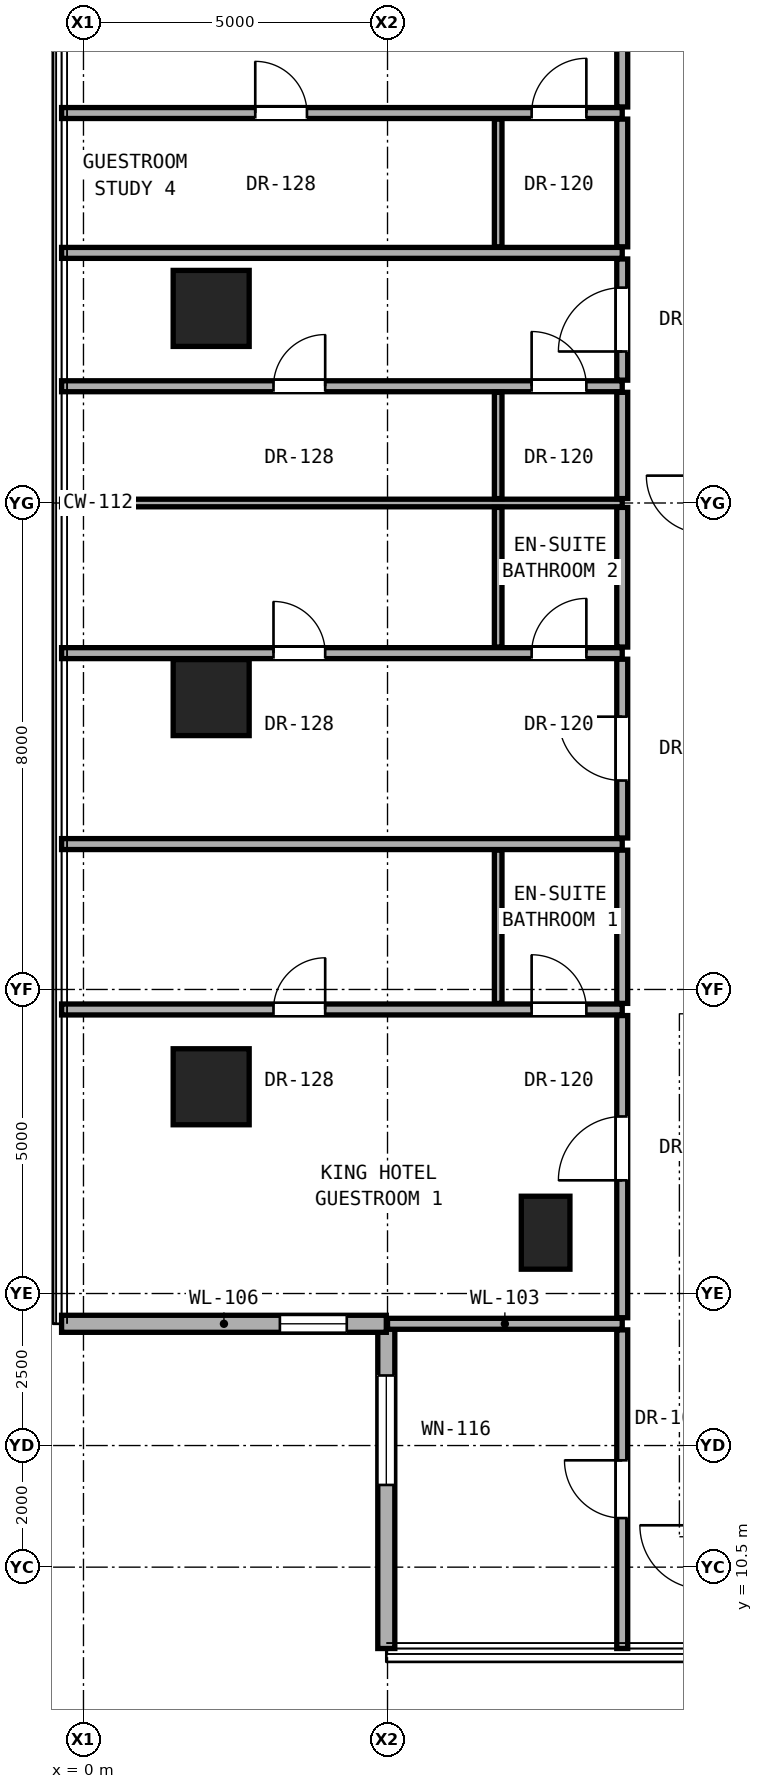
"""IFC4 building model, lengths in metres.
Left out: names, types, materials, properties, quantities, classifications, styles, units other than length and angle.
Written with IfcOpenShell. Run it as: python <this file> out.ifc"""

import sys

from ifc_helpers import new_model, si_unit, direction, frame, frame_2d, origin, origin_2d, place, context, subcontext, project, spatial, rectangle, hollow_rectangle, extrude, element, fill, save


model = new_model("IFC4")
c1 = context("Model", 3, precision=1e-05, world=origin(), true_north=direction((0.0, 1.0)))
c2 = subcontext(c1, "Body", "Model", "MODEL_VIEW")
j1 = project(units=[si_unit("LENGTHUNIT", "METRE"), si_unit("PLANEANGLEUNIT", "RADIAN")], contexts=[c1])
p1 = place(None, origin())
s1 = spatial("IfcSite", under=j1, at=p1, CompositionType="ELEMENT")
p2 = place(p1, origin())
s2 = spatial("IfcBuilding", under=s1, at=p2, CompositionType="ELEMENT")
p3 = place(p2, frame((0.0, 0.0, 55.4)))
s3 = spatial("IfcBuildingStorey", under=s2, at=p3, CompositionType="ELEMENT", Elevation=55.4)
for number, where, z_axis, x_axis in (
    (1, (2.1, 18.4, 0.0), (0.0, 0.0, 1.0), (1.0, 0.0, 0.0)),
    (2, (2.1, 24.8, 0.0), (0.0, 0.0, 1.0), (1.0, 0.0, 0.0)),
    (3, (2.1, 31.2, 0.0), (0.0, 0.0, 1.0), (1.0, 0.0, 0.0)),
):
    element("IfcColumn", number, at=place(p3, frame(where, z_axis=z_axis, x_axis=x_axis)), inside=s3, PredefinedType="COLUMN", context=c2, shape_type="SweptSolid", body=[
        extrude(hollow_rectangle(XDim=1.25, YDim=1.25, WallThickness=0.07, at=origin_2d()), origin(), (0.0, 0.0, 1.0), 3.3),
    ])
p4 = place(p3, frame((7.6, 16.0, 0.0), z_axis=(0.0, 0.0, 1.0), x_axis=(1.0, 0.0, 0.0)))
e4 = element("IfcColumn", 4, at=p4, inside=s3, PredefinedType="PILASTER", context=c2, shape_type="SweptSolid", body=[
    extrude(rectangle(XDim=0.8, YDim=1.2, at=origin_2d()), origin(), (0.0, 0.0, 1.0), 3.3),
])
p5 = place(p3, frame((4.98, 14.502, 0.0), z_axis=(0.0, 0.0, 1.0), x_axis=(0.0, -1.0, 0.0)))
e5 = element("IfcWall", 5, at=p5, inside=s3, PredefinedType="SOLIDWALL", context=c2, shape_type="SweptSolid", body=[
    extrude(rectangle(XDim=5.34, YDim=0.28, at=frame_2d((2.67, 0.0))), origin(), (0.0, 0.0, 1.0), 3.04),
])
p6 = place(p5, frame((0.85, 0.0, 0.79)))
e6 = element("IfcOpeningElement", 6, at=p6, cuts=e5, PredefinedType="OPENING", context=c2, shape_type="SweptSolid", body=[
    extrude(rectangle(XDim=1.8, YDim=2.1, at=frame_2d((0.9, 1.05))), frame((0.0, 0.15, 0.0), z_axis=(0.0, -1.0, 0.0), x_axis=(1.0, 0.0, 0.0)), (0.0, 0.0, 1.0), 0.3),
])
p7 = place(p3, frame((-0.36, 14.502, 0.0), z_axis=(0.0, 0.0, 1.0), x_axis=(1.0, 0.0, 0.0)))
e7 = element("IfcWall", 7, at=p7, inside=s3, PredefinedType="SOLIDWALL", context=c2, shape_type="SweptSolid", body=[
    extrude(rectangle(XDim=5.34, YDim=0.28, at=frame_2d((2.67, 0.0))), origin(), (0.0, 0.0, 1.0), 3.04),
])
p8 = place(p7, frame((3.59, 0.0, 0.85)))
e8 = element("IfcOpeningElement", 8, at=p8, cuts=e7, PredefinedType="OPENING", context=c2, shape_type="SweptSolid", body=[
    extrude(rectangle(XDim=1.1, YDim=2.0, at=frame_2d((0.55, 1.0))), frame((0.0, 0.15, 0.0), z_axis=(0.0, -1.0, 0.0), x_axis=(1.0, 0.0, 0.0)), (0.0, 0.0, 1.0), 0.3),
])
p9 = place(p3, frame((5.0, 14.502, 0.0), z_axis=(0.0, 0.0, 1.0), x_axis=(1.0, 0.0, 0.0)))
e9 = element("IfcWall", 9, at=p9, inside=s3, PredefinedType="PARTITIONING", context=c2, shape_type="SweptSolid", body=[
    extrude(rectangle(XDim=3.86, YDim=0.18, at=frame_2d((1.93, 0.0))), origin(), (0.0, 0.0, 1.0), 3.06),
])
p10 = place(p3, frame((-0.36, 19.671, 0.0), z_axis=(0.0, 0.0, 1.0), x_axis=(1.0, 0.0, 0.0)))
e10 = element("IfcWall", 10, at=p10, inside=s3, PredefinedType="PARTITIONING", context=c2, shape_type="SweptSolid", body=[
    extrude(rectangle(XDim=9.22, YDim=0.18, at=frame_2d((4.61, 0.0))), origin(), (0.0, 0.0, 1.0), 2.125),
])
p11 = place(p10, frame((3.485, 0.0, 0.0)))
e11 = element("IfcOpeningElement", 11, at=p11, cuts=e10, PredefinedType="OPENING", context=c2, shape_type="SweptSolid", body=[
    extrude(rectangle(XDim=0.85, YDim=2.01, at=frame_2d((0.425, 1.005))), frame((0.0, 0.1, 0.0), z_axis=(0.0, -1.0, 0.0), x_axis=(1.0, 0.0, 0.0)), (0.0, 0.0, 1.0), 0.2),
])
p12 = place(p10, frame((7.73, 0.0, 0.0)))
e12 = element("IfcOpeningElement", 12, at=p12, cuts=e10, PredefinedType="OPENING", context=c2, shape_type="SweptSolid", body=[
    extrude(rectangle(XDim=0.9, YDim=2.1, at=frame_2d((0.45, 1.05))), frame((0.0, 0.1, 0.0), z_axis=(0.0, -1.0, 0.0), x_axis=(1.0, 0.0, 0.0)), (0.0, 0.0, 1.0), 0.2),
])
p13 = place(p3, frame((-0.36, 22.391, 0.0), z_axis=(0.0, 0.0, 1.0), x_axis=(1.0, 0.0, 0.0)))
e13 = element("IfcWall", 13, at=p13, inside=s3, PredefinedType="PARTITIONING", context=c2, shape_type="SweptSolid", body=[
    extrude(rectangle(XDim=9.22, YDim=0.18, at=frame_2d((4.61, 0.0))), origin(), (0.0, 0.0, 1.0), 2.125),
])
p14 = place(p3, frame((-0.36, 25.531, 0.0), z_axis=(0.0, 0.0, 1.0), x_axis=(1.0, 0.0, 0.0)))
e14 = element("IfcWall", 14, at=p14, inside=s3, PredefinedType="PARTITIONING", context=c2, shape_type="SweptSolid", body=[
    extrude(rectangle(XDim=9.22, YDim=0.18, at=frame_2d((4.61, 0.0))), origin(), (0.0, 0.0, 1.0), 2.125),
])
p15 = place(p14, frame((3.485, 0.0, 0.0)))
e15 = element("IfcOpeningElement", 15, at=p15, cuts=e14, PredefinedType="OPENING", context=c2, shape_type="SweptSolid", body=[
    extrude(rectangle(XDim=0.85, YDim=2.01, at=frame_2d((0.425, 1.005))), frame((0.0, 0.1, 0.0), z_axis=(0.0, -1.0, 0.0), x_axis=(1.0, 0.0, 0.0)), (0.0, 0.0, 1.0), 0.2),
])
p16 = place(p14, frame((7.73, 0.0, 0.0)))
e16 = element("IfcOpeningElement", 16, at=p16, cuts=e14, PredefinedType="OPENING", context=c2, shape_type="SweptSolid", body=[
    extrude(rectangle(XDim=0.9, YDim=2.1, at=frame_2d((0.45, 1.05))), frame((0.0, 0.1, 0.0), z_axis=(0.0, -1.0, 0.0), x_axis=(1.0, 0.0, 0.0)), (0.0, 0.0, 1.0), 0.2),
])
p17 = place(p3, frame((-0.36, 28.0, 0.0), z_axis=(0.0, 0.0, 1.0), x_axis=(1.0, 0.0, 0.0)))
e17 = element("IfcWall", 17, at=p17, inside=s3, PredefinedType="PARTITIONING", context=c2, shape_type="SweptSolid", body=[
    extrude(rectangle(XDim=9.22, YDim=0.125, at=frame_2d((4.61, 0.0))), origin(), (0.0, 0.0, 1.0), 2.125),
])
p18 = place(p3, frame((-0.36, 29.92, 0.0), z_axis=(0.0, 0.0, 1.0), x_axis=(1.0, 0.0, 0.0)))
e18 = element("IfcWall", 18, at=p18, inside=s3, PredefinedType="PARTITIONING", context=c2, shape_type="SweptSolid", body=[
    extrude(rectangle(XDim=9.22, YDim=0.18, at=frame_2d((4.61, 0.0))), origin(), (0.0, 0.0, 1.0), 2.125),
])
p19 = place(p18, frame((3.485, 0.0, 0.0)))
e19 = element("IfcOpeningElement", 19, at=p19, cuts=e18, PredefinedType="OPENING", context=c2, shape_type="SweptSolid", body=[
    extrude(rectangle(XDim=0.85, YDim=2.01, at=frame_2d((0.425, 1.005))), frame((0.0, 0.1, 0.0), z_axis=(0.0, -1.0, 0.0), x_axis=(1.0, 0.0, 0.0)), (0.0, 0.0, 1.0), 0.2),
])
p20 = place(p18, frame((7.73, 0.0, 0.0)))
e20 = element("IfcOpeningElement", 20, at=p20, cuts=e18, PredefinedType="OPENING", context=c2, shape_type="SweptSolid", body=[
    extrude(rectangle(XDim=0.9, YDim=2.1, at=frame_2d((0.45, 1.05))), frame((0.0, 0.1, 0.0), z_axis=(0.0, -1.0, 0.0), x_axis=(1.0, 0.0, 0.0)), (0.0, 0.0, 1.0), 0.2),
])
p21 = place(p3, frame((-0.36, 32.113, 0.0), z_axis=(0.0, 0.0, 1.0), x_axis=(1.0, 0.0, 0.0)))
e21 = element("IfcWall", 21, at=p21, inside=s3, PredefinedType="PARTITIONING", context=c2, shape_type="SweptSolid", body=[
    extrude(rectangle(XDim=9.22, YDim=0.18, at=frame_2d((4.61, 0.0))), origin(), (0.0, 0.0, 1.0), 2.125),
])
p22 = place(p3, frame((-0.36, 34.413, 0.0), z_axis=(0.0, 0.0, 1.0), x_axis=(1.0, 0.0, 0.0)))
e22 = element("IfcWall", 22, at=p22, inside=s3, PredefinedType="PARTITIONING", context=c2, shape_type="SweptSolid", body=[
    extrude(rectangle(XDim=9.22, YDim=0.18, at=frame_2d((4.61, 0.0))), origin(), (0.0, 0.0, 1.0), 2.125),
])
p23 = place(p22, frame((3.185, 0.0, 0.0)))
e23 = element("IfcOpeningElement", 23, at=p23, cuts=e22, PredefinedType="OPENING", context=c2, shape_type="SweptSolid", body=[
    extrude(rectangle(XDim=0.85, YDim=2.01, at=frame_2d((0.425, 1.005))), frame((0.0, 0.1, 0.0), z_axis=(0.0, -1.0, 0.0), x_axis=(1.0, 0.0, 0.0)), (0.0, 0.0, 1.0), 0.2),
])
p24 = place(p22, frame((7.73, 0.0, 0.0)))
e24 = element("IfcOpeningElement", 24, at=p24, cuts=e22, PredefinedType="OPENING", context=c2, shape_type="SweptSolid", body=[
    extrude(rectangle(XDim=0.9, YDim=2.1, at=frame_2d((0.45, 1.05))), frame((0.0, 0.1, 0.0), z_axis=(0.0, -1.0, 0.0), x_axis=(1.0, 0.0, 0.0)), (0.0, 0.0, 1.0), 0.2),
])
p25 = place(p3, frame((6.82, 19.771, 0.0), z_axis=(0.0, 0.0, 1.0), x_axis=(0.0, 1.0, 0.0)))
e25 = element("IfcWall", 25, at=p25, inside=s3, PredefinedType="PARTITIONING", context=c2, shape_type="SweptSolid", body=[
    extrude(rectangle(XDim=2.52, YDim=0.125, at=frame_2d((1.26, 0.0))), origin(), (0.0, 0.0, 1.0), 3.06),
])
p26 = place(p3, frame((6.82, 25.631, 0.0), z_axis=(0.0, 0.0, 1.0), x_axis=(0.0, 1.0, 0.0)))
e26 = element("IfcWall", 26, at=p26, inside=s3, PredefinedType="PARTITIONING", context=c2, shape_type="SweptSolid", body=[
    extrude(rectangle(XDim=2.296, YDim=0.125, at=frame_2d((1.148, 0.0))), origin(), (0.0, 0.0, 1.0), 3.06),
])
p27 = place(p3, frame((6.82, 28.073, 0.0), z_axis=(0.0, 0.0, 1.0), x_axis=(0.0, 1.0, 0.0)))
e27 = element("IfcWall", 27, at=p27, inside=s3, PredefinedType="PARTITIONING", context=c2, shape_type="SweptSolid", body=[
    extrude(rectangle(XDim=1.748, YDim=0.125, at=frame_2d((0.874, 0.0))), origin(), (0.0, 0.0, 1.0), 3.06),
])
p28 = place(p3, frame((6.82, 32.213, 0.0), z_axis=(0.0, 0.0, 1.0), x_axis=(0.0, 1.0, 0.0)))
e28 = element("IfcWall", 28, at=p28, inside=s3, PredefinedType="PARTITIONING", context=c2, shape_type="SweptSolid", body=[
    extrude(rectangle(XDim=2.1, YDim=0.125, at=frame_2d((1.05, 0.0))), origin(), (0.0, 0.0, 1.0), 3.06),
])
p29 = place(p3, frame((8.86, 9.162, 0.0), z_axis=(0.0, 0.0, 1.0), x_axis=(0.0, 1.0, 0.0)))
e29 = element("IfcWall", 29, at=p29, inside=s3, PredefinedType="PARTITIONING", context=c2, shape_type="SweptSolid", body=[
    extrude(rectangle(XDim=5.24, YDim=0.18, at=frame_2d((2.62, 0.0))), origin(), (0.0, 0.0, 1.0), 3.06),
])
p30 = place(p29, frame((2.145, 0.0, 0.0)))
e30 = element("IfcOpeningElement", 30, at=p30, cuts=e29, PredefinedType="OPENING", context=c2, shape_type="SweptSolid", body=[
    extrude(rectangle(XDim=0.95, YDim=2.15, at=frame_2d((0.475, 1.075))), frame((0.0, 0.1, 0.0), z_axis=(0.0, -1.0, 0.0), x_axis=(1.0, 0.0, 0.0)), (0.0, 0.0, 1.0), 0.2),
])
p31 = place(p3, frame((8.86, 14.602, 0.0), z_axis=(0.0, 0.0, 1.0), x_axis=(0.0, 1.0, 0.0)))
e31 = element("IfcWall", 31, at=p31, inside=s3, PredefinedType="PARTITIONING", context=c2, shape_type="SweptSolid", body=[
    extrude(rectangle(XDim=4.969, YDim=0.18, at=frame_2d((2.484, 0.0))), origin(), (0.0, 0.0, 1.0), 2.436),
])
p32 = place(p31, frame((2.26, 0.0, 0.0)))
e32 = element("IfcOpeningElement", 32, at=p32, cuts=e31, PredefinedType="OPENING", context=c2, shape_type="SweptSolid", body=[
    extrude(rectangle(XDim=1.05, YDim=2.2, at=frame_2d((0.525, 1.1))), frame((0.0, 0.1, 0.0), z_axis=(0.0, -1.0, 0.0), x_axis=(1.0, 0.0, 0.0)), (0.0, 0.0, 1.0), 0.2),
])
p33 = place(p3, frame((8.86, 19.771, 0.0), z_axis=(0.0, 0.0, 1.0), x_axis=(0.0, 1.0, 0.0)))
e33 = element("IfcWall", 33, at=p33, inside=s3, PredefinedType="PARTITIONING", context=c2, shape_type="SweptSolid", body=[
    extrude(rectangle(XDim=2.52, YDim=0.18, at=frame_2d((1.26, 0.0))), origin(), (0.0, 0.0, 1.0), 3.06),
])
p34 = place(p3, frame((8.86, 22.491, 0.0), z_axis=(0.0, 0.0, 1.0), x_axis=(0.0, 1.0, 0.0)))
e34 = element("IfcWall", 34, at=p34, inside=s3, PredefinedType="PARTITIONING", context=c2, shape_type="SweptSolid", body=[
    extrude(rectangle(XDim=2.94, YDim=0.18, at=frame_2d((1.47, 0.0))), origin(), (0.0, 0.0, 1.0), 2.279),
])
p35 = place(p34, frame((0.945, 0.0, 0.0)))
e35 = element("IfcOpeningElement", 35, at=p35, cuts=e34, PredefinedType="OPENING", context=c2, shape_type="SweptSolid", body=[
    extrude(rectangle(XDim=1.05, YDim=2.2, at=frame_2d((0.525, 1.1))), frame((0.0, 0.1, 0.0), z_axis=(0.0, -1.0, 0.0), x_axis=(1.0, 0.0, 0.0)), (0.0, 0.0, 1.0), 0.2),
])
p36 = place(p3, frame((8.86, 25.631, 0.0), z_axis=(0.0, 0.0, 1.0), x_axis=(0.0, 1.0, 0.0)))
e36 = element("IfcWall", 36, at=p36, inside=s3, PredefinedType="PARTITIONING", context=c2, shape_type="SweptSolid", body=[
    extrude(rectangle(XDim=2.296, YDim=0.18, at=frame_2d((1.148, 0.0))), origin(), (0.0, 0.0, 1.0), 3.06),
])
p37 = place(p3, frame((8.86, 28.073, 0.0), z_axis=(0.0, 0.0, 1.0), x_axis=(0.0, 1.0, 0.0)))
e37 = element("IfcWall", 37, at=p37, inside=s3, PredefinedType="PARTITIONING", context=c2, shape_type="SweptSolid", body=[
    extrude(rectangle(XDim=1.748, YDim=0.18, at=frame_2d((0.874, 0.0))), origin(), (0.0, 0.0, 1.0), 3.06),
])
p38 = place(p3, frame((8.86, 30.02, 0.0), z_axis=(0.0, 0.0, 1.0), x_axis=(0.0, 1.0, 0.0)))
e38 = element("IfcWall", 38, at=p38, inside=s3, PredefinedType="PARTITIONING", context=c2, shape_type="SweptSolid", body=[
    extrude(rectangle(XDim=1.993, YDim=0.18, at=frame_2d((0.997, 0.0))), origin(), (0.0, 0.0, 1.0), 2.279),
])
p39 = place(p38, frame((0.471, 0.0, 0.0)))
e39 = element("IfcOpeningElement", 39, at=p39, cuts=e38, PredefinedType="OPENING", context=c2, shape_type="SweptSolid", body=[
    extrude(rectangle(XDim=1.05, YDim=2.2, at=frame_2d((0.525, 1.1))), frame((0.0, 0.1, 0.0), z_axis=(0.0, -1.0, 0.0), x_axis=(1.0, 0.0, 0.0)), (0.0, 0.0, 1.0), 0.2),
])
p40 = place(p3, frame((8.86, 32.213, 0.0), z_axis=(0.0, 0.0, 1.0), x_axis=(0.0, 1.0, 0.0)))
e40 = element("IfcWall", 40, at=p40, inside=s3, PredefinedType="PARTITIONING", context=c2, shape_type="SweptSolid", body=[
    extrude(rectangle(XDim=2.1, YDim=0.18, at=frame_2d((1.05, 0.0))), origin(), (0.0, 0.0, 1.0), 3.06),
])
p41 = place(p3, frame((8.86, 34.513, 0.0), z_axis=(0.0, 0.0, 1.0), x_axis=(0.0, 1.0, 0.0)))
e41 = element("IfcWall", 41, at=p41, inside=s3, PredefinedType="PARTITIONING", context=c2, shape_type="SweptSolid", body=[
    extrude(rectangle(XDim=6.885, YDim=0.18, at=frame_2d((3.442, 0.0))), origin(), (0.0, 0.0, 1.0), 2.436),
])
p42 = place(p41, frame((2.917, 0.0, 0.0)))
e42 = element("IfcOpeningElement", 42, at=p42, cuts=e41, PredefinedType="OPENING", context=c2, shape_type="SweptSolid", body=[
    extrude(rectangle(XDim=1.05, YDim=2.2, at=frame_2d((0.525, 1.1))), frame((0.0, 0.1, 0.0), z_axis=(0.0, -1.0, 0.0), x_axis=(1.0, 0.0, 0.0)), (0.0, 0.0, 1.0), 0.2),
])
p43 = place(p6, origin())
e43 = element("IfcWindow", 43, at=p43, inside=s3, PartitioningType="SINGLE_PANEL", PredefinedType="WINDOW", context=c2, shape_type="SweptSolid", body=[
    extrude(rectangle(XDim=1.8, YDim=2.1, at=frame_2d((0.9, 1.05))), frame((0.0, 0.03, 0.0), z_axis=(0.0, -1.0, 0.0), x_axis=(1.0, 0.0, 0.0)), (0.0, 0.0, 1.0), 0.06),
])
fill(e6, e43)
p44 = place(p8, origin())
e44 = element("IfcWindow", 44, at=p44, inside=s3, PartitioningType="SINGLE_PANEL", PredefinedType="WINDOW", context=c2, shape_type="SweptSolid", body=[
    extrude(rectangle(XDim=1.1, YDim=2.0, at=frame_2d((0.55, 1.0))), frame((0.0, 0.03, 0.0), z_axis=(0.0, -1.0, 0.0), x_axis=(1.0, 0.0, 0.0)), (0.0, 0.0, 1.0), 0.06),
])
fill(e8, e44)
p45 = place(p32, origin())
e45 = element("IfcDoor", 45, at=p45, inside=s3, OperationType="SINGLE_SWING_LEFT", PredefinedType="DOOR", context=c2, shape_type="SweptSolid", body=[
    extrude(rectangle(XDim=1.05, YDim=2.2, at=frame_2d((0.525, 1.1))), frame((0.0, 0.025, 0.0), z_axis=(0.0, -1.0, 0.0), x_axis=(1.0, 0.0, 0.0)), (0.0, 0.0, 1.0), 0.05),
])
fill(e32, e45)
p46 = place(p11, origin())
e46 = element("IfcDoor", 46, at=p46, inside=s3, OperationType="SINGLE_SWING_RIGHT", PredefinedType="DOOR", context=c2, shape_type="SweptSolid", body=[
    extrude(rectangle(XDim=0.85, YDim=2.01, at=frame_2d((0.425, 1.005))), frame((0.0, 0.025, 0.0), z_axis=(0.0, -1.0, 0.0), x_axis=(1.0, 0.0, 0.0)), (0.0, 0.0, 1.0), 0.05),
])
fill(e11, e46)
p47 = place(p12, origin())
e47 = element("IfcDoor", 47, at=p47, inside=s3, OperationType="SINGLE_SWING_LEFT", PredefinedType="DOOR", context=c2, shape_type="SweptSolid", body=[
    extrude(rectangle(XDim=0.9, YDim=2.1, at=frame_2d((0.45, 1.05))), frame((0.0, 0.025, 0.0), z_axis=(0.0, -1.0, 0.0), x_axis=(1.0, 0.0, 0.0)), (0.0, 0.0, 1.0), 0.05),
])
fill(e12, e47)
p48 = place(p35, origin())
e48 = element("IfcDoor", 48, at=p48, inside=s3, OperationType="SINGLE_SWING_RIGHT", PredefinedType="DOOR", context=c2, shape_type="SweptSolid", body=[
    extrude(rectangle(XDim=1.05, YDim=2.2, at=frame_2d((0.525, 1.1))), frame((0.0, 0.025, 0.0), z_axis=(0.0, -1.0, 0.0), x_axis=(1.0, 0.0, 0.0)), (0.0, 0.0, 1.0), 0.05),
])
fill(e35, e48)
p49 = place(p15, origin())
e49 = element("IfcDoor", 49, at=p49, inside=s3, OperationType="SINGLE_SWING_LEFT", PredefinedType="DOOR", context=c2, shape_type="SweptSolid", body=[
    extrude(rectangle(XDim=0.85, YDim=2.01, at=frame_2d((0.425, 1.005))), frame((0.0, 0.025, 0.0), z_axis=(0.0, -1.0, 0.0), x_axis=(1.0, 0.0, 0.0)), (0.0, 0.0, 1.0), 0.05),
])
fill(e15, e49)
p50 = place(p16, origin())
e50 = element("IfcDoor", 50, at=p50, inside=s3, OperationType="SINGLE_SWING_RIGHT", PredefinedType="DOOR", context=c2, shape_type="SweptSolid", body=[
    extrude(rectangle(XDim=0.9, YDim=2.1, at=frame_2d((0.45, 1.05))), frame((0.0, 0.025, 0.0), z_axis=(0.0, -1.0, 0.0), x_axis=(1.0, 0.0, 0.0)), (0.0, 0.0, 1.0), 0.05),
])
fill(e16, e50)
p51 = place(p39, origin())
e51 = element("IfcDoor", 51, at=p51, inside=s3, OperationType="SINGLE_SWING_LEFT", PredefinedType="DOOR", context=c2, shape_type="SweptSolid", body=[
    extrude(rectangle(XDim=1.05, YDim=2.2, at=frame_2d((0.525, 1.1))), frame((0.0, 0.025, 0.0), z_axis=(0.0, -1.0, 0.0), x_axis=(1.0, 0.0, 0.0)), (0.0, 0.0, 1.0), 0.05),
])
fill(e39, e51)
p52 = place(p19, origin())
e52 = element("IfcDoor", 52, at=p52, inside=s3, OperationType="SINGLE_SWING_RIGHT", PredefinedType="DOOR", context=c2, shape_type="SweptSolid", body=[
    extrude(rectangle(XDim=0.85, YDim=2.01, at=frame_2d((0.425, 1.005))), frame((0.0, 0.025, 0.0), z_axis=(0.0, -1.0, 0.0), x_axis=(1.0, 0.0, 0.0)), (0.0, 0.0, 1.0), 0.05),
])
fill(e19, e52)
p53 = place(p20, origin())
e53 = element("IfcDoor", 53, at=p53, inside=s3, OperationType="SINGLE_SWING_LEFT", PredefinedType="DOOR", context=c2, shape_type="SweptSolid", body=[
    extrude(rectangle(XDim=0.9, YDim=2.1, at=frame_2d((0.45, 1.05))), frame((0.0, 0.025, 0.0), z_axis=(0.0, -1.0, 0.0), x_axis=(1.0, 0.0, 0.0)), (0.0, 0.0, 1.0), 0.05),
])
fill(e20, e53)
p54 = place(p23, origin())
e54 = element("IfcDoor", 54, at=p54, inside=s3, OperationType="SINGLE_SWING_LEFT", PredefinedType="DOOR", context=c2, shape_type="SweptSolid", body=[
    extrude(rectangle(XDim=0.85, YDim=2.01, at=frame_2d((0.425, 1.005))), frame((0.0, 0.025, 0.0), z_axis=(0.0, -1.0, 0.0), x_axis=(1.0, 0.0, 0.0)), (0.0, 0.0, 1.0), 0.05),
])
fill(e23, e54)
p55 = place(p24, origin())
e55 = element("IfcDoor", 55, at=p55, inside=s3, OperationType="SINGLE_SWING_RIGHT", PredefinedType="DOOR", context=c2, shape_type="SweptSolid", body=[
    extrude(rectangle(XDim=0.9, YDim=2.1, at=frame_2d((0.45, 1.05))), frame((0.0, 0.025, 0.0), z_axis=(0.0, -1.0, 0.0), x_axis=(1.0, 0.0, 0.0)), (0.0, 0.0, 1.0), 0.05),
])
fill(e24, e55)
p56 = place(p30, origin())
e56 = element("IfcDoor", 56, at=p56, inside=s3, OperationType="SINGLE_SWING_RIGHT", PredefinedType="DOOR", context=c2, shape_type="SweptSolid", body=[
    extrude(rectangle(XDim=0.95, YDim=2.15, at=frame_2d((0.475, 1.075))), frame((0.0, 0.025, 0.0), z_axis=(0.0, -1.0, 0.0), x_axis=(1.0, 0.0, 0.0)), (0.0, 0.0, 1.0), 0.05),
])
fill(e30, e56)
save(model, sys.argv[1])
